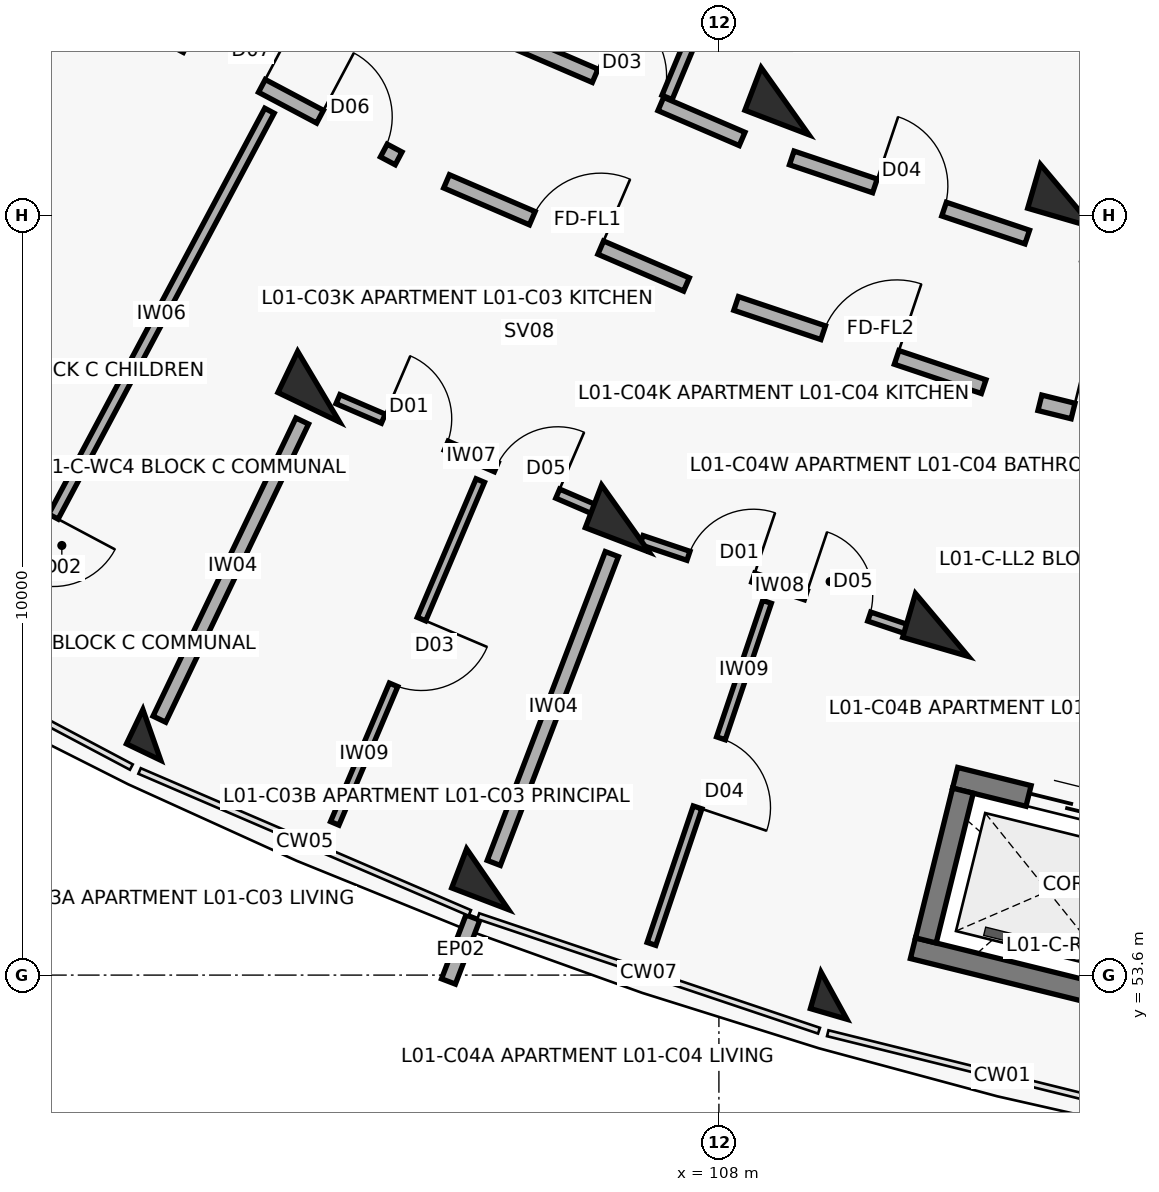
"""IFC4 building model, lengths in metres.
Left out: names, types, materials, properties, quantities, classifications, styles, units other than length and angle.
Written with IfcOpenShell. Run it as: python <this file> out.ifc"""

import sys

from ifc_helpers import new_model, si_unit, direction, frame, frame_2d, origin, origin_2d, place, context, subcontext, project, spatial, rectangle, extrude, element, fill, save


model = new_model("IFC4")
c1 = context("Model", 3, precision=1e-05, world=origin(), true_north=direction((0.0, 1.0)))
c2 = subcontext(c1, "Body", "Model", "MODEL_VIEW")
j1 = project(units=[si_unit("LENGTHUNIT", "METRE"), si_unit("PLANEANGLEUNIT", "RADIAN")], contexts=[c1])
p1 = place(None, origin())
s1 = spatial("IfcSite", under=j1, at=p1, CompositionType="ELEMENT")
p2 = place(p1, origin())
s2 = spatial("IfcBuilding", under=s1, at=p2, CompositionType="ELEMENT")
p3 = place(p2, frame((0.0, 0.0, 4.5)))
s3 = spatial("IfcBuildingStorey", under=s2, at=p3, CompositionType="ELEMENT", Elevation=4.5)
for number, where, z_axis, x_axis in (
    (1, (98.853, 63.4, 0.0), (0.0, 0.0, 1.0), (-0.504, -0.864, 0.0)),
    (2, (102.734, 61.341, 0.0), (0.0, 0.0, 1.0), (-0.432, -0.902, 0.0)),
):
    element("IfcColumn", number, at=place(p3, frame(where, z_axis=z_axis, x_axis=x_axis)), inside=s3, PredefinedType="COLUMN", context=c2, shape_type="SweptSolid", body=[
        extrude(rectangle(XDim=0.6, YDim=0.9, at=origin_2d()), origin(), (0.0, 0.0, 1.0), 3.6),
    ])
p4 = place(p3, frame((100.539, 56.76, 0.0), z_axis=(0.0, 0.0, 1.0), x_axis=(-0.432085748802, -0.901832526405, 0.0)))
e3 = element("IfcColumn", 3, at=p4, inside=s3, PredefinedType="COLUMN", context=c2, shape_type="SweptSolid", body=[
    extrude(rectangle(XDim=0.5, YDim=0.5, at=origin_2d()), origin(), (0.0, 0.0, 1.0), 3.6),
])
for number, where, z_axis, x_axis in (
    (4, (108.869, 65.099, 0.0), (0.0, 0.0, 1.0), (-0.357, -0.934, 0.0)),
    (5, (106.77, 59.606, 0.0), (0.0, 0.0, 1.0), (-0.357, -0.934, 0.0)),
):
    element("IfcColumn", number, at=place(p3, frame(where, z_axis=z_axis, x_axis=x_axis)), inside=s3, PredefinedType="COLUMN", context=c2, shape_type="SweptSolid", body=[
        extrude(rectangle(XDim=0.6, YDim=0.9, at=origin_2d()), origin(), (0.0, 0.0, 1.0), 3.6),
    ])
p5 = place(p3, frame((104.956, 54.861, 0.0), z_axis=(0.0, 0.0, 1.0), x_axis=(-0.357064076459, -0.934079892355, 0.0)))
e6 = element("IfcColumn", 6, at=p5, inside=s3, PredefinedType="COLUMN", context=c2, shape_type="SweptSolid", body=[
    extrude(rectangle(XDim=0.55, YDim=0.8, at=origin_2d()), origin(), (0.0, 0.0, 1.0), 3.6),
])
for number, where, z_axis, x_axis in (
    (7, (112.579, 63.852, 0.0), (0.0, 0.0, 1.0), (-0.28, -0.96, 0.0)),
    (8, (110.934, 58.207, 0.0), (0.0, 0.0, 1.0), (-0.28, -0.96, 0.0)),
):
    element("IfcColumn", number, at=place(p3, frame(where, z_axis=z_axis, x_axis=x_axis)), inside=s3, PredefinedType="COLUMN", context=c2, shape_type="SweptSolid", body=[
        extrude(rectangle(XDim=0.6, YDim=0.9, at=origin_2d()), origin(), (0.0, 0.0, 1.0), 3.6),
    ])
p6 = place(p3, frame((109.513, 53.329, 0.0), z_axis=(0.0, 0.0, 1.0), x_axis=(-0.27966144946, -0.96009867914, 0.0)))
e9 = element("IfcColumn", 9, at=p6, inside=s3, PredefinedType="COLUMN", context=c2, shape_type="SweptSolid", body=[
    extrude(rectangle(XDim=0.5, YDim=0.5, at=origin_2d()), origin(), (0.0, 0.0, 1.0), 3.6),
])
p7 = place(p3, frame((104.763, 54.357, 0.0), z_axis=(0.0, 0.0, 1.0), x_axis=(-0.357033038474, -0.934091756434, 0.0)))
e10 = element("IfcWall", 10, at=p7, inside=s3, PredefinedType="PARAPET", context=c2, shape_type="SweptSolid", body=[
    extrude(rectangle(XDim=0.9, YDim=0.195, at=frame_2d((0.45, 0.0))), origin(), (0.0, 0.0, 1.0), 2.6),
])
p8 = place(p3, frame((111.108, 56.196, 0.0), z_axis=(0.0, 0.0, 1.0), x_axis=(0.970706856107, -0.240266933861, 0.0)))
e11 = element("IfcWall", 11, at=p8, inside=s3, PredefinedType="SHEAR", context=c2, shape_type="SweptSolid", body=[
    extrude(rectangle(XDim=3.09, YDim=0.28, at=frame_2d((1.545, 0.0))), origin(), (0.0, 0.0, 1.0), 3.6),
])
p9 = place(p8, frame((0.995, 0.0, 0.0)))
e12 = element("IfcOpeningElement", 12, at=p9, cuts=e11, PredefinedType="OPENING", context=c2, shape_type="SweptSolid", body=[
    extrude(rectangle(XDim=1.1, YDim=2.15, at=frame_2d((0.55, 1.075))), frame((0.0, 0.15, 0.0), z_axis=(0.0, -1.0, 0.0), x_axis=(1.0, 0.0, 0.0)), (0.0, 0.0, 1.0), 0.3),
])
p10 = place(p3, frame((110.553, 53.954, 0.0), z_axis=(0.0, 0.0, 1.0), x_axis=(0.970725280816, -0.240192483614, 0.0)))
e13 = element("IfcWall", 13, at=p10, inside=s3, PredefinedType="SHEAR", context=c2, shape_type="SweptSolid", body=[
    extrude(rectangle(XDim=3.09, YDim=0.28, at=frame_2d((1.545, 0.0))), origin(), (0.0, 0.0, 1.0), 3.6),
])
p11 = place(p3, frame((111.21, 56.027, 0.0), z_axis=(0.0, 0.0, 1.0), x_axis=(-0.240186044774, -0.970726873995, 0.0)))
e14 = element("IfcWall", 14, at=p11, inside=s3, PredefinedType="SHEAR", context=c2, shape_type="SweptSolid", body=[
    extrude(rectangle(XDim=2.03, YDim=0.28, at=frame_2d((1.015, 0.0))), origin(), (0.0, 0.0, 1.0), 3.6),
])
p12 = place(p3, frame((100.75, 65.956, 0.0), z_axis=(0.0, 0.0, 1.0), x_axis=(0.883440266101, -0.468543803963, 0.0)))
e15 = element("IfcWall", 15, at=p12, inside=s3, PredefinedType="SOLIDWALL", context=c2, shape_type="SweptSolid", body=[
    extrude(rectangle(XDim=3.436, YDim=0.19, at=frame_2d((1.718, 0.0))), origin(), (0.0, 0.0, 1.0), 2.58),
])
p13 = place(p12, frame((0.28, 0.0, 0.0)))
e16 = element("IfcOpeningElement", 16, at=p13, cuts=e15, PredefinedType="OPENING", context=c2, shape_type="SweptSolid", body=[
    extrude(rectangle(XDim=1.12, YDim=2.15, at=frame_2d((0.56, 1.075))), frame((0.0, 0.105, 0.0), z_axis=(0.0, -1.0, 0.0), x_axis=(1.0, 0.0, 0.0)), (0.0, 0.0, 1.0), 0.21),
])
p14 = place(p12, frame((2.266, 0.0, 0.0)))
e17 = element("IfcOpeningElement", 17, at=p14, cuts=e15, PredefinedType="OPENING", context=c2, shape_type="SweptSolid", body=[
    extrude(rectangle(XDim=0.95, YDim=2.1, at=frame_2d((0.475, 1.05))), frame((0.0, 0.105, 0.0), z_axis=(0.0, -1.0, 0.0), x_axis=(1.0, 0.0, 0.0)), (0.0, 0.0, 1.0), 0.21),
])
p15 = place(p3, frame((102.087, 64.973, 0.0), z_axis=(0.0, 0.0, 1.0), x_axis=(-0.469878800394, -0.882730940287, 0.0)))
e18 = element("IfcWall", 18, at=p15, inside=s3, PredefinedType="PARTITIONING", context=c2, shape_type="SweptSolid", body=[
    extrude(rectangle(XDim=7.95, YDim=0.14, at=frame_2d((3.975, 0.0))), origin(), (0.0, 0.0, 1.0), 2.58),
])
p16 = place(p15, frame((6.05, 0.0, 0.0)))
e19 = element("IfcOpeningElement", 19, at=p16, cuts=e18, PredefinedType="OPENING", context=c2, shape_type="SweptSolid", body=[
    extrude(rectangle(XDim=0.92, YDim=2.1, at=frame_2d((0.46, 1.05))), frame((0.0, 0.08, 0.0), z_axis=(0.0, -1.0, 0.0), x_axis=(1.0, 0.0, 0.0)), (0.0, 0.0, 1.0), 0.16),
])
p17 = place(p3, frame((104.417, 64.044, 0.0), z_axis=(0.0, 0.0, 1.0), x_axis=(0.918718172399, -0.394913813008, 0.0)))
e20 = element("IfcWall", 20, at=p17, inside=s3, PredefinedType="SOLIDWALL", context=c2, shape_type="SweptSolid", body=[
    extrude(rectangle(XDim=3.436, YDim=0.19, at=frame_2d((1.718, 0.0))), origin(), (0.0, 0.0, 1.0), 2.58),
])
p18 = place(p17, frame((1.228, 0.0, 0.0)))
e21 = element("IfcOpeningElement", 21, at=p18, cuts=e20, PredefinedType="OPENING", context=c2, shape_type="SweptSolid", body=[
    extrude(rectangle(XDim=0.98, YDim=2.15, at=frame_2d((0.49, 1.075))), frame((0.0, 0.105, 0.0), z_axis=(0.0, -1.0, 0.0), x_axis=(1.0, 0.0, 0.0)), (0.0, 0.0, 1.0), 0.21),
])
p19 = place(p3, frame((105.302, 65.893, 0.0), z_axis=(0.0, 0.0, 1.0), x_axis=(0.918723391052, -0.394901672235, 0.0)))
e22 = element("IfcWall", 22, at=p19, inside=s3, PredefinedType="SOLIDWALL", context=c2, shape_type="SweptSolid", body=[
    extrude(rectangle(XDim=3.269, YDim=0.19, at=frame_2d((1.634, 0.0))), origin(), (0.0, 0.0, 1.0), 2.58),
])
p20 = place(p19, frame((1.164, 0.0, 0.0)))
e23 = element("IfcOpeningElement", 23, at=p20, cuts=e22, PredefinedType="OPENING", context=c2, shape_type="SweptSolid", body=[
    extrude(rectangle(XDim=0.94, YDim=2.1, at=frame_2d((0.47, 1.05))), frame((0.0, 0.105, 0.0), z_axis=(0.0, -1.0, 0.0), x_axis=(1.0, 0.0, 0.0)), (0.0, 0.0, 1.0), 0.21),
])
p21 = place(p3, frame((108.589, 68.194, 0.0), z_axis=(0.0, 0.0, 1.0), x_axis=(-0.385151143297, -0.922853507777, 0.0)))
e24 = element("IfcWall", 24, at=p21, inside=s3, PredefinedType="PARTITIONING", context=c2, shape_type="SweptSolid", body=[
    extrude(rectangle(XDim=3.3, YDim=0.145, at=frame_2d((1.65, 0.0))), origin(), (0.0, 0.0, 1.0), 2.58),
])
p22 = place(p21, frame((1.21, 0.0, 0.0)))
e25 = element("IfcOpeningElement", 25, at=p22, cuts=e24, PredefinedType="OPENING", context=c2, shape_type="SweptSolid", body=[
    extrude(rectangle(XDim=0.88, YDim=2.1, at=frame_2d((0.44, 1.05))), frame((0.0, 0.083, 0.0), z_axis=(0.0, -1.0, 0.0), x_axis=(1.0, 0.0, 0.0)), (0.0, 0.0, 1.0), 0.165),
])
p23 = place(p3, frame((102.988, 61.178, 0.0), z_axis=(0.0, 0.0, 1.0), x_axis=(0.918732171064, -0.394881245253, 0.0)))
e26 = element("IfcWall", 26, at=p23, inside=s3, PredefinedType="PARTITIONING", context=c2, shape_type="SweptSolid", body=[
    extrude(rectangle(XDim=3.797, YDim=0.13, at=frame_2d((1.899, 0.0))), origin(), (0.0, 0.0, 1.0), 2.58),
])
p24 = place(p23, frame((0.65, 0.0, 0.0)))
e27 = element("IfcOpeningElement", 27, at=p24, cuts=e26, PredefinedType="OPENING", context=c2, shape_type="SweptSolid", body=[
    extrude(rectangle(XDim=0.9, YDim=2.1, at=frame_2d((0.45, 1.05))), frame((0.0, 0.075, 0.0), z_axis=(0.0, -1.0, 0.0), x_axis=(1.0, 0.0, 0.0)), (0.0, 0.0, 1.0), 0.15),
])
p25 = place(p23, frame((2.267, 0.0, 0.0)))
e28 = element("IfcOpeningElement", 28, at=p25, cuts=e26, PredefinedType="OPENING", context=c2, shape_type="SweptSolid", body=[
    extrude(rectangle(XDim=0.88, YDim=2.1, at=frame_2d((0.44, 1.05))), frame((0.0, 0.075, 0.0), z_axis=(0.0, -1.0, 0.0), x_axis=(1.0, 0.0, 0.0)), (0.0, 0.0, 1.0), 0.15),
])
p26 = place(p3, frame((104.86, 60.107, 0.0), z_axis=(0.0, 0.0, 1.0), x_axis=(-0.390783996242, -0.920482410631, 0.0)))
e29 = element("IfcWall", 29, at=p26, inside=s3, PredefinedType="PARTITIONING", context=c2, shape_type="SweptSolid", body=[
    extrude(rectangle(XDim=4.9, YDim=0.12, at=frame_2d((2.45, 0.0))), origin(), (0.0, 0.0, 1.0), 2.58),
])
p27 = place(p26, frame((1.98, 0.0, 0.0)))
e30 = element("IfcOpeningElement", 30, at=p27, cuts=e29, PredefinedType="OPENING", context=c2, shape_type="SweptSolid", body=[
    extrude(rectangle(XDim=0.94, YDim=2.1, at=frame_2d((0.47, 1.05))), frame((0.0, 0.07, 0.0), z_axis=(0.0, -1.0, 0.0), x_axis=(1.0, 0.0, 0.0)), (0.0, 0.0, 1.0), 0.14),
])
p28 = place(p3, frame((102.518, 60.89, 0.0), z_axis=(0.0, 0.0, 1.0), x_axis=(-0.432108769108, -0.901821496561, 0.0)))
e31 = element("IfcWall", 31, at=p28, inside=s3, PredefinedType="SOLIDWALL", context=c2, shape_type="SweptSolid", body=[
    extrude(rectangle(XDim=4.35, YDim=0.185, at=frame_2d((2.175, 0.0))), origin(), (0.0, 0.0, 1.0), 2.58),
])
p29 = place(p3, frame((108.227, 62.437, 0.0), z_axis=(0.0, 0.0, 1.0), x_axis=(0.947884468821, -0.318614239745, 0.0)))
e32 = element("IfcWall", 32, at=p29, inside=s3, PredefinedType="SOLIDWALL", context=c2, shape_type="SweptSolid", body=[
    extrude(rectangle(XDim=3.436, YDim=0.19, at=frame_2d((1.718, 0.0))), origin(), (0.0, 0.0, 1.0), 2.58),
])
p30 = place(p29, frame((1.208, 0.0, 0.0)))
e33 = element("IfcOpeningElement", 33, at=p30, cuts=e32, PredefinedType="OPENING", context=c2, shape_type="SweptSolid", body=[
    extrude(rectangle(XDim=1.02, YDim=2.15, at=frame_2d((0.51, 1.075))), frame((0.0, 0.105, 0.0), z_axis=(0.0, -1.0, 0.0), x_axis=(1.0, 0.0, 0.0)), (0.0, 0.0, 1.0), 0.21),
])
p31 = place(p3, frame((108.958, 64.352, 0.0), z_axis=(0.0, 0.0, 1.0), x_axis=(0.94787351033, -0.318646839643, 0.0)))
e34 = element("IfcWall", 34, at=p31, inside=s3, PredefinedType="SOLIDWALL", context=c2, shape_type="SweptSolid", body=[
    extrude(rectangle(XDim=3.269, YDim=0.19, at=frame_2d((1.634, 0.0))), origin(), (0.0, 0.0, 1.0), 2.58),
])
p32 = place(p31, frame((1.154, 0.0, 0.0)))
e35 = element("IfcOpeningElement", 35, at=p32, cuts=e34, PredefinedType="OPENING", context=c2, shape_type="SweptSolid", body=[
    extrude(rectangle(XDim=0.96, YDim=2.1, at=frame_2d((0.48, 1.05))), frame((0.0, 0.105, 0.0), z_axis=(0.0, -1.0, 0.0), x_axis=(1.0, 0.0, 0.0)), (0.0, 0.0, 1.0), 0.21),
])
p33 = place(p3, frame((106.983, 59.324, 0.0), z_axis=(0.0, 0.0, 1.0), x_axis=(0.947879193428, -0.318629933725, 0.0)))
e36 = element("IfcWall", 36, at=p33, inside=s3, PredefinedType="PARTITIONING", context=c2, shape_type="SweptSolid", body=[
    extrude(rectangle(XDim=3.81, YDim=0.125, at=frame_2d((1.905, 0.0))), origin(), (0.0, 0.0, 1.0), 2.58),
])
p34 = place(p33, frame((0.65, 0.0, 0.0)))
e37 = element("IfcOpeningElement", 37, at=p34, cuts=e36, PredefinedType="OPENING", context=c2, shape_type="SweptSolid", body=[
    extrude(rectangle(XDim=0.9, YDim=2.1, at=frame_2d((0.45, 1.05))), frame((0.0, 0.073, 0.0), z_axis=(0.0, -1.0, 0.0), x_axis=(1.0, 0.0, 0.0)), (0.0, 0.0, 1.0), 0.145),
])
p35 = place(p33, frame((2.28, 0.0, 0.0)))
e38 = element("IfcOpeningElement", 38, at=p35, cuts=e36, PredefinedType="OPENING", context=c2, shape_type="SweptSolid", body=[
    extrude(rectangle(XDim=0.88, YDim=2.1, at=frame_2d((0.44, 1.05))), frame((0.0, 0.073, 0.0), z_axis=(0.0, -1.0, 0.0), x_axis=(1.0, 0.0, 0.0)), (0.0, 0.0, 1.0), 0.145),
])
p36 = place(p3, frame((108.633, 58.511, 0.0), z_axis=(0.0, 0.0, 1.0), x_axis=(-0.320064719126, -0.947395680574, 0.0)))
e39 = element("IfcWall", 39, at=p36, inside=s3, PredefinedType="PARTITIONING", context=c2, shape_type="SweptSolid", body=[
    extrude(rectangle(XDim=4.75, YDim=0.12, at=frame_2d((2.375, 0.0))), origin(), (0.0, 0.0, 1.0), 2.58),
])
p37 = place(p36, frame((1.895, 0.0, 0.0)))
e40 = element("IfcOpeningElement", 40, at=p37, cuts=e39, PredefinedType="OPENING", context=c2, shape_type="SweptSolid", body=[
    extrude(rectangle(XDim=0.96, YDim=2.1, at=frame_2d((0.48, 1.05))), frame((0.0, 0.07, 0.0), z_axis=(0.0, -1.0, 0.0), x_axis=(1.0, 0.0, 0.0)), (0.0, 0.0, 1.0), 0.14),
])
p38 = place(p3, frame((106.591, 59.139, 0.0), z_axis=(0.0, 0.0, 1.0), x_axis=(-0.357064016205, -0.934079915388, 0.0)))
e41 = element("IfcWall", 41, at=p38, inside=s3, PredefinedType="SOLIDWALL", context=c2, shape_type="SweptSolid", body=[
    extrude(rectangle(XDim=4.35, YDim=0.185, at=frame_2d((2.175, 0.0))), origin(), (0.0, 0.0, 1.0), 2.58),
])
p39 = place(p3, frame((112.223, 61.13, 0.0), z_axis=(0.0, 0.0, 1.0), x_axis=(0.970719238682, -0.240216901263, 0.0)))
e42 = element("IfcWall", 42, at=p39, inside=s3, PredefinedType="SOLIDWALL", context=c2, shape_type="SweptSolid", body=[
    extrude(rectangle(XDim=3.296, YDim=0.21, at=frame_2d((1.648, 0.0))), origin(), (0.0, 0.0, 1.0), 2.58),
])
p40 = place(p39, frame((0.45, 0.0, 0.0)))
e43 = element("IfcOpeningElement", 43, at=p40, cuts=e42, PredefinedType="OPENING", context=c2, shape_type="SweptSolid", body=[
    extrude(rectangle(XDim=1.1, YDim=2.15, at=frame_2d((0.55, 1.075))), frame((0.0, 0.115, 0.0), z_axis=(0.0, -1.0, 0.0), x_axis=(1.0, 0.0, 0.0)), (0.0, 0.0, 1.0), 0.23),
])
p41 = place(p39, frame((1.726, 0.0, 0.0)))
e44 = element("IfcOpeningElement", 44, at=p41, cuts=e42, PredefinedType="OPENING", context=c2, shape_type="SweptSolid", body=[
    extrude(rectangle(XDim=1.12, YDim=2.15, at=frame_2d((0.56, 1.075))), frame((0.0, 0.115, 0.0), z_axis=(0.0, -1.0, 0.0), x_axis=(1.0, 0.0, 0.0)), (0.0, 0.0, 1.0), 0.23),
])
p42 = place(p9, origin())
e45 = element("IfcDoor", 45, at=p42, inside=s3, OperationType="DOUBLE_DOOR_SLIDING", PredefinedType="DOOR", context=c2, shape_type="SweptSolid", body=[
    extrude(rectangle(XDim=1.1, YDim=2.15, at=frame_2d((0.55, 1.075))), frame((0.0, 0.025, 0.0), z_axis=(0.0, -1.0, 0.0), x_axis=(1.0, 0.0, 0.0)), (0.0, 0.0, 1.0), 0.05),
])
fill(e12, e45)
p43 = place(p13, origin())
e46 = element("IfcDoor", 46, at=p43, inside=s3, OperationType="SINGLE_SWING_RIGHT", PredefinedType="DOOR", context=c2, shape_type="SweptSolid", body=[
    extrude(rectangle(XDim=1.12, YDim=2.15, at=frame_2d((0.56, 1.075))), frame((0.0, 0.025, 0.0), z_axis=(0.0, -1.0, 0.0), x_axis=(1.0, 0.0, 0.0)), (0.0, 0.0, 1.0), 0.05),
])
fill(e16, e46)
p44 = place(p14, origin())
e47 = element("IfcDoor", 47, at=p44, inside=s3, OperationType="SINGLE_SWING_LEFT", PredefinedType="DOOR", context=c2, shape_type="SweptSolid", body=[
    extrude(rectangle(XDim=0.95, YDim=2.1, at=frame_2d((0.475, 1.05))), frame((0.0, 0.025, 0.0), z_axis=(0.0, -1.0, 0.0), x_axis=(1.0, 0.0, 0.0)), (0.0, 0.0, 1.0), 0.05),
])
fill(e17, e47)
p45 = place(p16, origin())
e48 = element("IfcDoor", 48, at=p45, inside=s3, OperationType="SINGLE_SWING_LEFT", PredefinedType="DOOR", context=c2, shape_type="SweptSolid", body=[
    extrude(rectangle(XDim=0.92, YDim=2.1, at=frame_2d((0.46, 1.05))), frame((0.0, 0.025, 0.0), z_axis=(0.0, -1.0, 0.0), x_axis=(1.0, 0.0, 0.0)), (0.0, 0.0, 1.0), 0.05),
])
fill(e19, e48)
p46 = place(p18, origin())
e49 = element("IfcDoor", 49, at=p46, inside=s3, OperationType="SINGLE_SWING_RIGHT", PredefinedType="DOOR", context=c2, shape_type="SweptSolid", body=[
    extrude(rectangle(XDim=0.98, YDim=2.15, at=frame_2d((0.49, 1.075))), frame((0.0, 0.025, 0.0), z_axis=(0.0, -1.0, 0.0), x_axis=(1.0, 0.0, 0.0)), (0.0, 0.0, 1.0), 0.05),
])
fill(e21, e49)
p47 = place(p20, origin())
e50 = element("IfcDoor", 50, at=p47, inside=s3, OperationType="SINGLE_SWING_LEFT", PredefinedType="DOOR", context=c2, shape_type="SweptSolid", body=[
    extrude(rectangle(XDim=0.94, YDim=2.1, at=frame_2d((0.47, 1.05))), frame((0.0, 0.025, 0.0), z_axis=(0.0, -1.0, 0.0), x_axis=(1.0, 0.0, 0.0)), (0.0, 0.0, 1.0), 0.05),
])
fill(e23, e50)
p48 = place(p24, origin())
e51 = element("IfcDoor", 51, at=p48, inside=s3, OperationType="SINGLE_SWING_LEFT", PredefinedType="DOOR", context=c2, shape_type="SweptSolid", body=[
    extrude(rectangle(XDim=0.9, YDim=2.1, at=frame_2d((0.45, 1.05))), frame((0.0, 0.025, 0.0), z_axis=(0.0, -1.0, 0.0), x_axis=(1.0, 0.0, 0.0)), (0.0, 0.0, 1.0), 0.05),
])
fill(e27, e51)
p49 = place(p25, origin())
e52 = element("IfcDoor", 52, at=p49, inside=s3, OperationType="SINGLE_SWING_RIGHT", PredefinedType="DOOR", context=c2, shape_type="SweptSolid", body=[
    extrude(rectangle(XDim=0.88, YDim=2.1, at=frame_2d((0.44, 1.05))), frame((0.0, 0.025, 0.0), z_axis=(0.0, -1.0, 0.0), x_axis=(1.0, 0.0, 0.0)), (0.0, 0.0, 1.0), 0.05),
])
fill(e28, e52)
p50 = place(p27, origin())
e53 = element("IfcDoor", 53, at=p50, inside=s3, OperationType="SINGLE_SWING_LEFT", PredefinedType="DOOR", context=c2, shape_type="SweptSolid", body=[
    extrude(rectangle(XDim=0.94, YDim=2.1, at=frame_2d((0.47, 1.05))), frame((0.0, 0.025, 0.0), z_axis=(0.0, -1.0, 0.0), x_axis=(1.0, 0.0, 0.0)), (0.0, 0.0, 1.0), 0.05),
])
fill(e30, e53)
p51 = place(p30, origin())
e54 = element("IfcDoor", 54, at=p51, inside=s3, OperationType="SINGLE_SWING_RIGHT", PredefinedType="DOOR", context=c2, shape_type="SweptSolid", body=[
    extrude(rectangle(XDim=1.02, YDim=2.15, at=frame_2d((0.51, 1.075))), frame((0.0, 0.025, 0.0), z_axis=(0.0, -1.0, 0.0), x_axis=(1.0, 0.0, 0.0)), (0.0, 0.0, 1.0), 0.05),
])
fill(e33, e54)
p52 = place(p32, origin())
e55 = element("IfcDoor", 55, at=p52, inside=s3, OperationType="SINGLE_SWING_LEFT", PredefinedType="DOOR", context=c2, shape_type="SweptSolid", body=[
    extrude(rectangle(XDim=0.96, YDim=2.1, at=frame_2d((0.48, 1.05))), frame((0.0, 0.025, 0.0), z_axis=(0.0, -1.0, 0.0), x_axis=(1.0, 0.0, 0.0)), (0.0, 0.0, 1.0), 0.05),
])
fill(e35, e55)
p53 = place(p34, origin())
e56 = element("IfcDoor", 56, at=p53, inside=s3, OperationType="SINGLE_SWING_RIGHT", PredefinedType="DOOR", context=c2, shape_type="SweptSolid", body=[
    extrude(rectangle(XDim=0.9, YDim=2.1, at=frame_2d((0.45, 1.05))), frame((0.0, 0.025, 0.0), z_axis=(0.0, -1.0, 0.0), x_axis=(1.0, 0.0, 0.0)), (0.0, 0.0, 1.0), 0.05),
])
fill(e37, e56)
p54 = place(p35, origin())
e57 = element("IfcDoor", 57, at=p54, inside=s3, OperationType="SINGLE_SWING_LEFT", PredefinedType="DOOR", context=c2, shape_type="SweptSolid", body=[
    extrude(rectangle(XDim=0.88, YDim=2.1, at=frame_2d((0.44, 1.05))), frame((0.0, 0.025, 0.0), z_axis=(0.0, -1.0, 0.0), x_axis=(1.0, 0.0, 0.0)), (0.0, 0.0, 1.0), 0.05),
])
fill(e38, e57)
p55 = place(p37, origin())
e58 = element("IfcDoor", 58, at=p55, inside=s3, OperationType="SINGLE_SWING_RIGHT", PredefinedType="DOOR", context=c2, shape_type="SweptSolid", body=[
    extrude(rectangle(XDim=0.96, YDim=2.1, at=frame_2d((0.48, 1.05))), frame((0.0, 0.025, 0.0), z_axis=(0.0, -1.0, 0.0), x_axis=(1.0, 0.0, 0.0)), (0.0, 0.0, 1.0), 0.05),
])
fill(e40, e58)
p56 = place(p40, origin())
e59 = element("IfcDoor", 59, at=p56, inside=s3, OperationType="SINGLE_SWING_LEFT", PredefinedType="DOOR", context=c2, shape_type="SweptSolid", body=[
    extrude(rectangle(XDim=1.1, YDim=2.15, at=frame_2d((0.55, 1.075))), frame((0.0, 0.025, 0.0), z_axis=(0.0, -1.0, 0.0), x_axis=(1.0, 0.0, 0.0)), (0.0, 0.0, 1.0), 0.05),
])
fill(e43, e59)
save(model, sys.argv[1])
